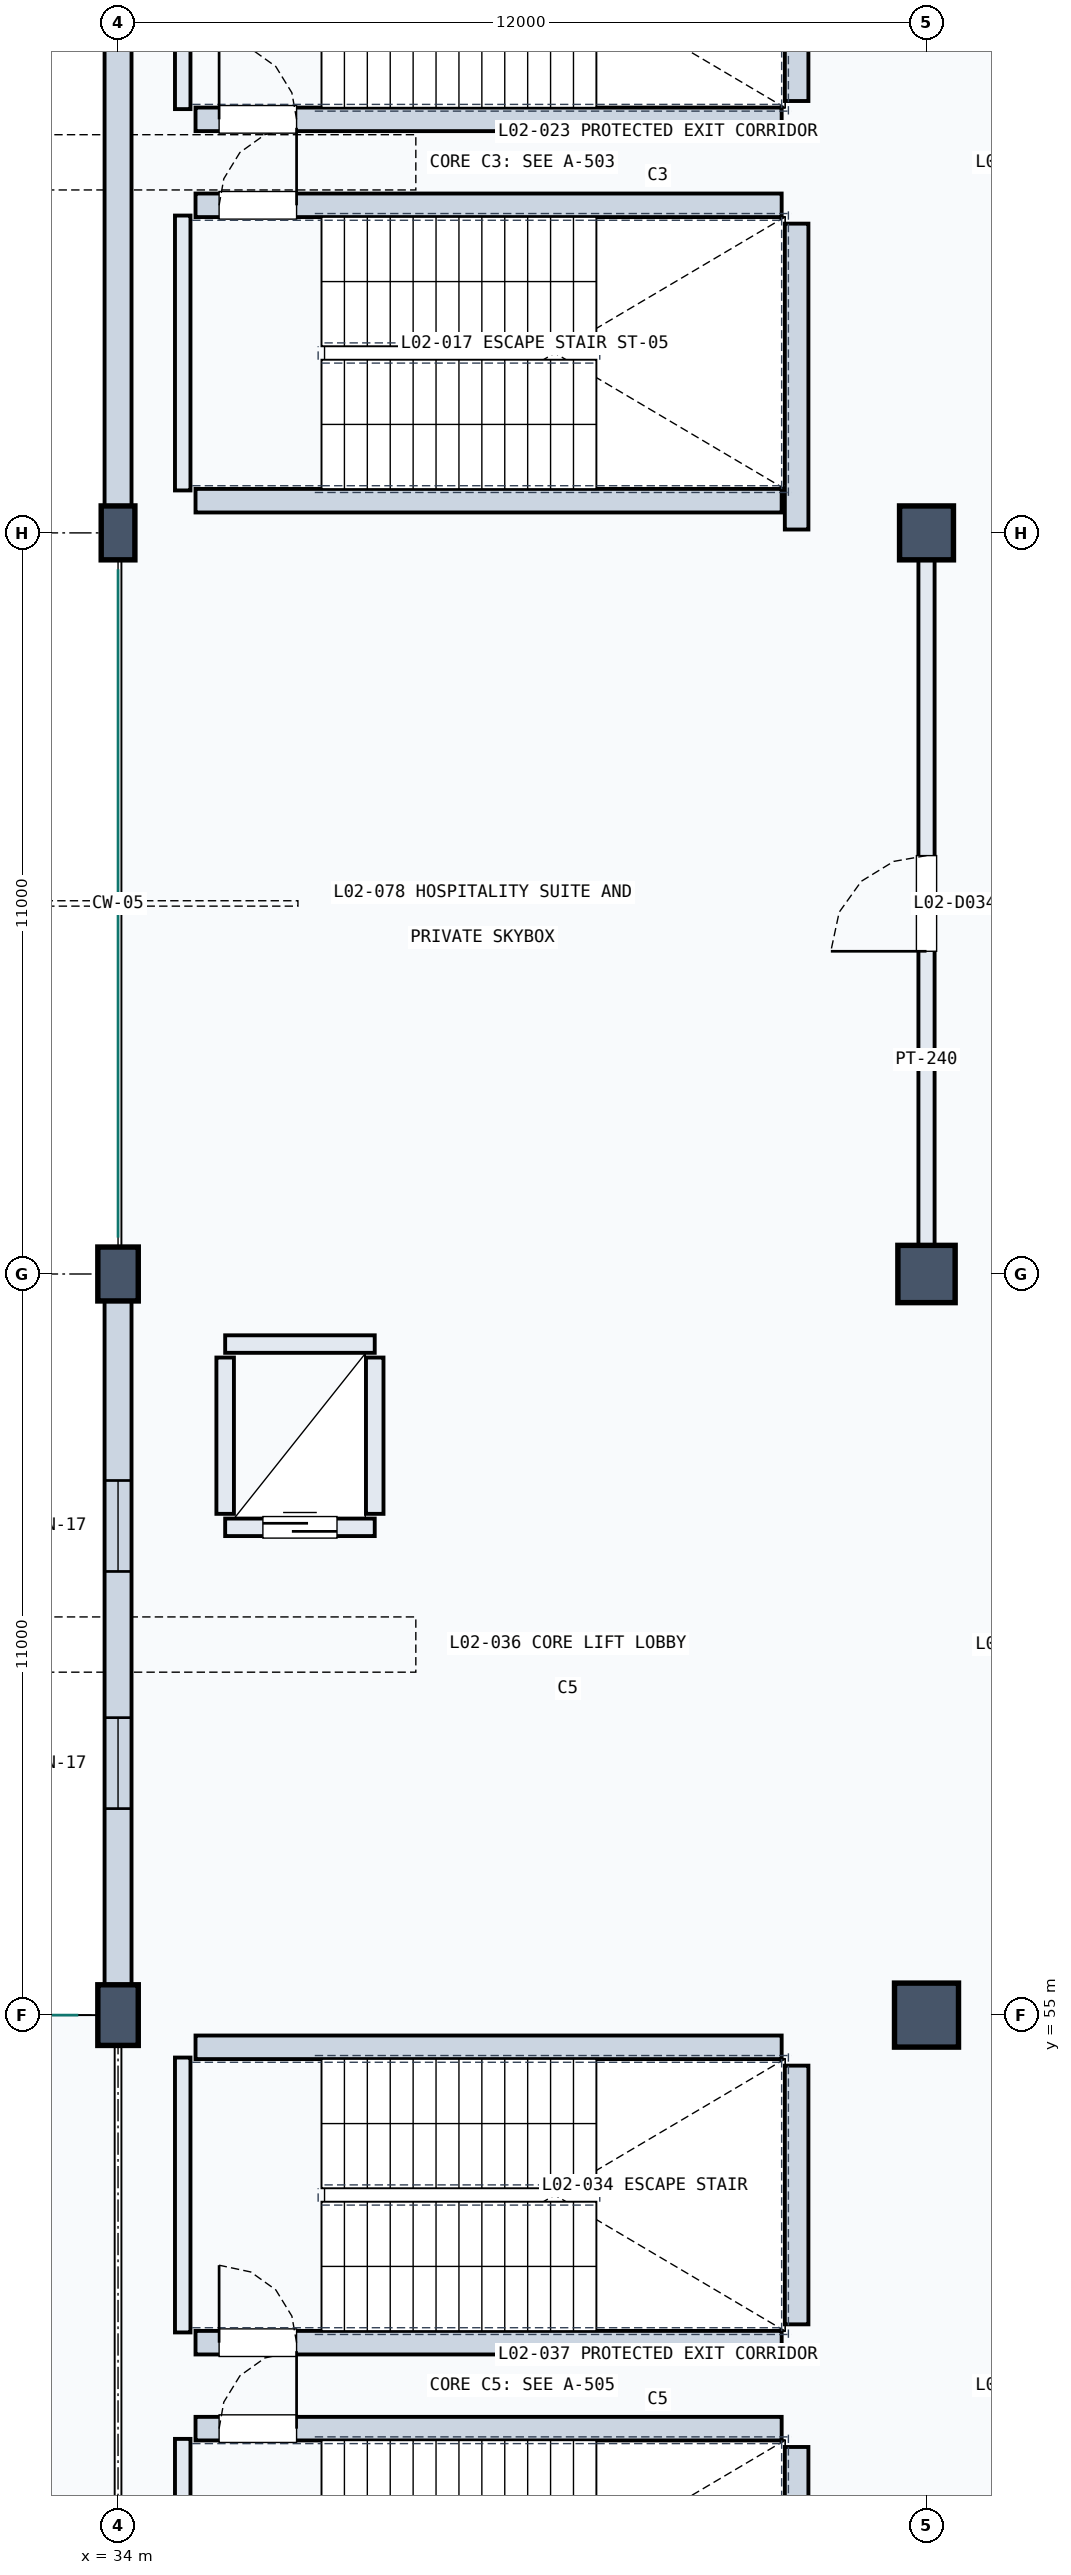
"""IFC4 building model, lengths in metres.
Left out: names, types, materials, properties, quantities, classifications, styles, units other than length and angle.
Written with IfcOpenShell. Run it as: python <this file> out.ifc"""

import sys

from ifc_helpers import new_model, si_unit, direction, frame, frame_2d, origin, origin_2d, place, context, subcontext, project, spatial, rectangle, extrude, element, fill, save


model = new_model("IFC4")
c1 = context("Model", 3, precision=1e-05, world=origin(), true_north=direction((0.0, 1.0)))
c2 = subcontext(c1, "Body", "Model", "MODEL_VIEW")
j1 = project(units=[si_unit("LENGTHUNIT", "METRE"), si_unit("PLANEANGLEUNIT", "RADIAN")], contexts=[c1])
p1 = place(None, origin())
s1 = spatial("IfcSite", under=j1, at=p1, CompositionType="ELEMENT")
p2 = place(p1, origin())
s2 = spatial("IfcBuilding", under=s1, at=p2, CompositionType="ELEMENT")
p3 = place(p2, frame((0.0, 0.0, 10.2)))
s3 = spatial("IfcBuildingStorey", under=s2, at=p3, CompositionType="ELEMENT", Elevation=10.2)
p4 = place(p3, frame((34.0, 55.0, 0.0), z_axis=(0.0, 0.0, 1.0), x_axis=(1.0, 0.0, 0.0)))
e1 = element("IfcColumn", 1, at=p4, inside=s3, PredefinedType="COLUMN", context=c2, shape_type="SweptSolid", body=[
    extrude(rectangle(XDim=0.6, YDim=0.9, at=origin_2d()), origin(), (0.0, 0.0, 1.0), 4.5),
])
p5 = place(p3, frame((34.0, 66.0, 0.0), z_axis=(0.0, 0.0, 1.0), x_axis=(1.0, 0.0, 0.0)))
e2 = element("IfcColumn", 2, at=p5, inside=s3, PredefinedType="COLUMN", context=c2, shape_type="SweptSolid", body=[
    extrude(rectangle(XDim=0.6, YDim=0.8, at=origin_2d()), origin(), (0.0, 0.0, 1.0), 4.5),
])
p6 = place(p3, frame((34.0, 77.0, 0.0), z_axis=(0.0, 0.0, 1.0), x_axis=(1.0, 0.0, 0.0)))
e3 = element("IfcColumn", 3, at=p6, inside=s3, PredefinedType="COLUMN", context=c2, shape_type="SweptSolid", body=[
    extrude(rectangle(XDim=0.5, YDim=0.8, at=origin_2d()), origin(), (0.0, 0.0, 1.0), 4.5),
])
p7 = place(p3, frame((46.0, 55.0, 0.0), z_axis=(0.0, 0.0, 1.0), x_axis=(1.0, 0.0, 0.0)))
e4 = element("IfcColumn", 4, at=p7, inside=s3, PredefinedType="COLUMN", context=c2, shape_type="SweptSolid", body=[
    extrude(rectangle(XDim=0.95, YDim=0.95, at=origin_2d()), origin(), (0.0, 0.0, 1.0), 4.5),
])
p8 = place(p3, frame((46.0, 66.0, 0.0), z_axis=(0.0, 0.0, 1.0), x_axis=(1.0, 0.0, 0.0)))
e5 = element("IfcColumn", 5, at=p8, inside=s3, PredefinedType="COLUMN", context=c2, shape_type="SweptSolid", body=[
    extrude(rectangle(XDim=0.85, YDim=0.85, at=origin_2d()), origin(), (0.0, 0.0, 1.0), 4.5),
])
p9 = place(p3, frame((46.0, 77.0, 0.0), z_axis=(0.0, 0.0, 1.0), x_axis=(1.0, 0.0, 0.0)))
e6 = element("IfcColumn", 6, at=p9, inside=s3, PredefinedType="COLUMN", context=c2, shape_type="SweptSolid", body=[
    extrude(rectangle(XDim=0.8, YDim=0.8, at=origin_2d()), origin(), (0.0, 0.0, 1.0), 4.5),
])
p10 = place(p3, frame((34.0, 55.22, 0.0), z_axis=(0.0, 0.0, 1.0), x_axis=(0.0, 1.0, 0.0)))
e7 = element("IfcWall", 7, at=p10, inside=s3, PredefinedType="SOLIDWALL", context=c2, shape_type="SweptSolid", body=[
    extrude(rectangle(XDim=10.56, YDim=0.4, at=frame_2d((5.28, 0.0))), origin(), (0.0, 0.0, 1.0), 3.39),
])
p11 = place(p10, frame((2.845, 0.0, 0.8)))
e8 = element("IfcOpeningElement", 8, at=p11, cuts=e7, PredefinedType="OPENING", context=c2, shape_type="SweptSolid", body=[
    extrude(rectangle(XDim=1.35, YDim=2.1, at=frame_2d((0.675, 1.05))), frame((0.0, 0.21, 0.0), z_axis=(0.0, -1.0, 0.0), x_axis=(1.0, 0.0, 0.0)), (0.0, 0.0, 1.0), 0.42),
])
p12 = place(p10, frame((6.365, 0.0, 0.8)))
e9 = element("IfcOpeningElement", 9, at=p12, cuts=e7, PredefinedType="OPENING", context=c2, shape_type="SweptSolid", body=[
    extrude(rectangle(XDim=1.35, YDim=2.1, at=frame_2d((0.675, 1.05))), frame((0.0, 0.21, 0.0), z_axis=(0.0, -1.0, 0.0), x_axis=(1.0, 0.0, 0.0)), (0.0, 0.0, 1.0), 0.42),
])
p13 = place(p3, frame((34.0, 77.22, 0.0), z_axis=(0.0, 0.0, 1.0), x_axis=(0.0, 1.0, 0.0)))
e10 = element("IfcWall", 10, at=p13, inside=s3, PredefinedType="SOLIDWALL", context=c2, shape_type="SweptSolid", body=[
    extrude(rectangle(XDim=10.56, YDim=0.4, at=frame_2d((5.28, 0.0))), origin(), (0.0, 0.0, 1.0), 3.405),
])
p14 = place(p3, frame((34.96, 77.63, 0.0), z_axis=(0.0, 0.0, 1.0), x_axis=(0.0, 1.0, 0.0)))
e11 = element("IfcWall", 11, at=p14, inside=s3, PredefinedType="SOLIDWALL", context=c2, shape_type="SweptSolid", body=[
    extrude(rectangle(XDim=4.08, YDim=0.23, at=frame_2d((2.04, 0.0))), origin(), (0.0, 0.0, 1.0), 4.14),
])
p15 = place(p3, frame((44.072, 77.05, 0.0), z_axis=(0.0, 0.0, 1.0), x_axis=(0.0, 1.0, 0.0)))
e12 = element("IfcWall", 12, at=p15, inside=s3, PredefinedType="SOLIDWALL", context=c2, shape_type="SweptSolid", body=[
    extrude(rectangle(XDim=4.54, YDim=0.35, at=frame_2d((2.27, 0.0))), origin(), (0.0, 0.0, 1.0), 4.14),
])
p16 = place(p3, frame((35.15, 77.478, 0.0), z_axis=(0.0, 0.0, 1.0), x_axis=(1.0, 0.0, 0.0)))
e13 = element("IfcWall", 13, at=p16, inside=s3, PredefinedType="SOLIDWALL", context=c2, shape_type="SweptSolid", body=[
    extrude(rectangle(XDim=8.7, YDim=0.35, at=frame_2d((4.35, 0.0))), origin(), (0.0, 0.0, 1.0), 4.14),
])
p17 = place(p3, frame((35.15, 81.862, 0.0), z_axis=(0.0, 0.0, 1.0), x_axis=(1.0, 0.0, 0.0)))
e14 = element("IfcWall", 14, at=p17, inside=s3, PredefinedType="SOLIDWALL", context=c2, shape_type="SweptSolid", body=[
    extrude(rectangle(XDim=8.7, YDim=0.35, at=frame_2d((4.35, 0.0))), origin(), (0.0, 0.0, 1.0), 4.14),
])
p18 = place(p17, frame((0.35, 0.0, 0.0)))
e15 = element("IfcOpeningElement", 15, at=p18, cuts=e14, PredefinedType="OPENING", context=c2, shape_type="SweptSolid", body=[
    extrude(rectangle(XDim=1.15, YDim=2.2, at=frame_2d((0.575, 1.1))), frame((0.0, 0.185, 0.0), z_axis=(0.0, -1.0, 0.0), x_axis=(1.0, 0.0, 0.0)), (0.0, 0.0, 1.0), 0.37),
])
p19 = place(p3, frame((34.96, 83.29, 0.0), z_axis=(0.0, 0.0, 1.0), x_axis=(0.0, 1.0, 0.0)))
e16 = element("IfcWall", 16, at=p19, inside=s3, PredefinedType="SOLIDWALL", context=c2, shape_type="SweptSolid", body=[
    extrude(rectangle(XDim=4.08, YDim=0.23, at=frame_2d((2.04, 0.0))), origin(), (0.0, 0.0, 1.0), 4.14),
])
p20 = place(p3, frame((44.072, 83.41, 0.0), z_axis=(0.0, 0.0, 1.0), x_axis=(0.0, 1.0, 0.0)))
e17 = element("IfcWall", 17, at=p20, inside=s3, PredefinedType="SOLIDWALL", context=c2, shape_type="SweptSolid", body=[
    extrude(rectangle(XDim=3.84, YDim=0.35, at=frame_2d((1.92, 0.0))), origin(), (0.0, 0.0, 1.0), 4.14),
])
p21 = place(p3, frame((35.15, 83.138, 0.0), z_axis=(0.0, 0.0, 1.0), x_axis=(1.0, 0.0, 0.0)))
e18 = element("IfcWall", 18, at=p21, inside=s3, PredefinedType="SOLIDWALL", context=c2, shape_type="SweptSolid", body=[
    extrude(rectangle(XDim=8.7, YDim=0.35, at=frame_2d((4.35, 0.0))), origin(), (0.0, 0.0, 1.0), 4.14),
])
p22 = place(p21, frame((0.35, 0.0, 0.0)))
e19 = element("IfcOpeningElement", 19, at=p22, cuts=e18, PredefinedType="OPENING", context=c2, shape_type="SweptSolid", body=[
    extrude(rectangle(XDim=1.15, YDim=2.2, at=frame_2d((0.575, 1.1))), frame((0.0, 0.185, 0.0), z_axis=(0.0, -1.0, 0.0), x_axis=(1.0, 0.0, 0.0)), (0.0, 0.0, 1.0), 0.37),
])
p23 = place(p3, frame((34.96, 44.63, 0.0), z_axis=(0.0, 0.0, 1.0), x_axis=(0.0, 1.0, 0.0)))
e20 = element("IfcWall", 20, at=p23, inside=s3, PredefinedType="SOLIDWALL", context=c2, shape_type="SweptSolid", body=[
    extrude(rectangle(XDim=4.08, YDim=0.23, at=frame_2d((2.04, 0.0))), origin(), (0.0, 0.0, 1.0), 4.14),
])
p24 = place(p3, frame((44.072, 44.05, 0.0), z_axis=(0.0, 0.0, 1.0), x_axis=(0.0, 1.0, 0.0)))
e21 = element("IfcWall", 21, at=p24, inside=s3, PredefinedType="SOLIDWALL", context=c2, shape_type="SweptSolid", body=[
    extrude(rectangle(XDim=4.54, YDim=0.35, at=frame_2d((2.27, 0.0))), origin(), (0.0, 0.0, 1.0), 4.14),
])
p25 = place(p3, frame((35.15, 48.862, 0.0), z_axis=(0.0, 0.0, 1.0), x_axis=(1.0, 0.0, 0.0)))
e22 = element("IfcWall", 22, at=p25, inside=s3, PredefinedType="SOLIDWALL", context=c2, shape_type="SweptSolid", body=[
    extrude(rectangle(XDim=8.7, YDim=0.35, at=frame_2d((4.35, 0.0))), origin(), (0.0, 0.0, 1.0), 4.14),
])
p26 = place(p25, frame((0.35, 0.0, 0.0)))
e23 = element("IfcOpeningElement", 23, at=p26, cuts=e22, PredefinedType="OPENING", context=c2, shape_type="SweptSolid", body=[
    extrude(rectangle(XDim=1.15, YDim=2.2, at=frame_2d((0.575, 1.1))), frame((0.0, 0.185, 0.0), z_axis=(0.0, -1.0, 0.0), x_axis=(1.0, 0.0, 0.0)), (0.0, 0.0, 1.0), 0.37),
])
p27 = place(p3, frame((34.96, 50.29, 0.0), z_axis=(0.0, 0.0, 1.0), x_axis=(0.0, 1.0, 0.0)))
e24 = element("IfcWall", 24, at=p27, inside=s3, PredefinedType="SOLIDWALL", context=c2, shape_type="SweptSolid", body=[
    extrude(rectangle(XDim=4.08, YDim=0.23, at=frame_2d((2.04, 0.0))), origin(), (0.0, 0.0, 1.0), 4.14),
])
p28 = place(p3, frame((44.072, 50.41, 0.0), z_axis=(0.0, 0.0, 1.0), x_axis=(0.0, 1.0, 0.0)))
e25 = element("IfcWall", 25, at=p28, inside=s3, PredefinedType="SOLIDWALL", context=c2, shape_type="SweptSolid", body=[
    extrude(rectangle(XDim=3.84, YDim=0.35, at=frame_2d((1.92, 0.0))), origin(), (0.0, 0.0, 1.0), 4.14),
])
p29 = place(p3, frame((35.15, 50.138, 0.0), z_axis=(0.0, 0.0, 1.0), x_axis=(1.0, 0.0, 0.0)))
e26 = element("IfcWall", 26, at=p29, inside=s3, PredefinedType="SOLIDWALL", context=c2, shape_type="SweptSolid", body=[
    extrude(rectangle(XDim=8.7, YDim=0.35, at=frame_2d((4.35, 0.0))), origin(), (0.0, 0.0, 1.0), 4.14),
])
p30 = place(p29, frame((0.35, 0.0, 0.0)))
e27 = element("IfcOpeningElement", 27, at=p30, cuts=e26, PredefinedType="OPENING", context=c2, shape_type="SweptSolid", body=[
    extrude(rectangle(XDim=1.15, YDim=2.2, at=frame_2d((0.575, 1.1))), frame((0.0, 0.185, 0.0), z_axis=(0.0, -1.0, 0.0), x_axis=(1.0, 0.0, 0.0)), (0.0, 0.0, 1.0), 0.37),
])
p31 = place(p3, frame((35.15, 54.522, 0.0), z_axis=(0.0, 0.0, 1.0), x_axis=(1.0, 0.0, 0.0)))
e28 = element("IfcWall", 28, at=p31, inside=s3, PredefinedType="SOLIDWALL", context=c2, shape_type="SweptSolid", body=[
    extrude(rectangle(XDim=8.7, YDim=0.35, at=frame_2d((4.35, 0.0))), origin(), (0.0, 0.0, 1.0), 4.14),
])
p32 = place(p3, frame((35.59, 62.24, 0.0), z_axis=(0.0, 0.0, 1.0), x_axis=(1.0, 0.0, 0.0)))
e29 = element("IfcWall", 29, at=p32, inside=s3, PredefinedType="SOLIDWALL", context=c2, shape_type="SweptSolid", body=[
    extrude(rectangle(XDim=2.22, YDim=0.26, at=frame_2d((1.11, 0.0))), origin(), (0.0, 0.0, 1.0), 4.14),
])
p33 = place(p32, frame((0.56, 0.0, 0.0)))
e30 = element("IfcOpeningElement", 30, at=p33, cuts=e29, PredefinedType="OPENING", context=c2, shape_type="SweptSolid", body=[
    extrude(rectangle(XDim=1.1, YDim=2.15, at=frame_2d((0.55, 1.075))), frame((0.0, 0.14, 0.0), z_axis=(0.0, -1.0, 0.0), x_axis=(1.0, 0.0, 0.0)), (0.0, 0.0, 1.0), 0.28),
])
p34 = place(p3, frame((35.59, 64.96, 0.0), z_axis=(0.0, 0.0, 1.0), x_axis=(1.0, 0.0, 0.0)))
e31 = element("IfcWall", 31, at=p34, inside=s3, PredefinedType="SOLIDWALL", context=c2, shape_type="SweptSolid", body=[
    extrude(rectangle(XDim=2.22, YDim=0.26, at=frame_2d((1.11, 0.0))), origin(), (0.0, 0.0, 1.0), 4.14),
])
for number, where, z_axis, x_axis in (
    (32, (35.59, 62.44, 0.0), (0.0, 0.0, 1.0), (0.0, 1.0, 0.0)),
    (33, (37.81, 62.44, 0.0), (0.0, 0.0, 1.0), (0.0, 1.0, 0.0)),
):
    element("IfcWall", number, at=place(p3, frame(where, z_axis=z_axis, x_axis=x_axis)), inside=s3, PredefinedType="SOLIDWALL", context=c2, shape_type="SweptSolid", body=[
        extrude(rectangle(XDim=2.32, YDim=0.26, at=frame_2d((1.16, 0.0))), origin(), (0.0, 0.0, 1.0), 4.14),
    ])
p35 = place(p3, frame((46.0, 66.22, 0.0), z_axis=(0.0, 0.0, 1.0), x_axis=(0.0, 1.0, 0.0)))
e34 = element("IfcWall", 34, at=p35, inside=s3, PredefinedType="PARTITIONING", context=c2, shape_type="SweptSolid", body=[
    extrude(rectangle(XDim=10.56, YDim=0.24, at=frame_2d((5.28, 0.0))), origin(), (0.0, 0.0, 1.0), 3.405),
])
p36 = place(p35, frame((4.57, 0.0, 0.0)))
e35 = element("IfcOpeningElement", 35, at=p36, cuts=e34, PredefinedType="OPENING", context=c2, shape_type="SweptSolid", body=[
    extrude(rectangle(XDim=1.42, YDim=2.25, at=frame_2d((0.71, 1.125))), frame((0.0, 0.13, 0.0), z_axis=(0.0, -1.0, 0.0), x_axis=(1.0, 0.0, 0.0)), (0.0, 0.0, 1.0), 0.26),
])
p37 = place(p11, origin())
e36 = element("IfcWindow", 36, at=p37, inside=s3, PartitioningType="SINGLE_PANEL", PredefinedType="WINDOW", context=c2, shape_type="SweptSolid", body=[
    extrude(rectangle(XDim=1.35, YDim=2.1, at=frame_2d((0.675, 1.05))), frame((0.0, 0.03, 0.0), z_axis=(0.0, -1.0, 0.0), x_axis=(1.0, 0.0, 0.0)), (0.0, 0.0, 1.0), 0.06),
])
fill(e8, e36)
p38 = place(p12, origin())
e37 = element("IfcWindow", 37, at=p38, inside=s3, PartitioningType="SINGLE_PANEL", PredefinedType="WINDOW", context=c2, shape_type="SweptSolid", body=[
    extrude(rectangle(XDim=1.35, YDim=2.1, at=frame_2d((0.675, 1.05))), frame((0.0, 0.03, 0.0), z_axis=(0.0, -1.0, 0.0), x_axis=(1.0, 0.0, 0.0)), (0.0, 0.0, 1.0), 0.06),
])
fill(e9, e37)
p39 = place(p18, origin())
e38 = element("IfcDoor", 38, at=p39, inside=s3, OperationType="SINGLE_SWING_RIGHT", PredefinedType="DOOR", context=c2, shape_type="SweptSolid", body=[
    extrude(rectangle(XDim=1.15, YDim=2.2, at=frame_2d((0.575, 1.1))), frame((0.0, 0.025, 0.0), z_axis=(0.0, -1.0, 0.0), x_axis=(1.0, 0.0, 0.0)), (0.0, 0.0, 1.0), 0.05),
])
fill(e15, e38)
p40 = place(p22, origin())
e39 = element("IfcDoor", 39, at=p40, inside=s3, OperationType="SINGLE_SWING_LEFT", PredefinedType="DOOR", context=c2, shape_type="SweptSolid", body=[
    extrude(rectangle(XDim=1.15, YDim=2.2, at=frame_2d((0.575, 1.1))), frame((0.0, 0.025, 0.0), z_axis=(0.0, -1.0, 0.0), x_axis=(1.0, 0.0, 0.0)), (0.0, 0.0, 1.0), 0.05),
])
fill(e19, e39)
p41 = place(p26, origin())
e40 = element("IfcDoor", 40, at=p41, inside=s3, OperationType="SINGLE_SWING_RIGHT", PredefinedType="DOOR", context=c2, shape_type="SweptSolid", body=[
    extrude(rectangle(XDim=1.15, YDim=2.2, at=frame_2d((0.575, 1.1))), frame((0.0, 0.025, 0.0), z_axis=(0.0, -1.0, 0.0), x_axis=(1.0, 0.0, 0.0)), (0.0, 0.0, 1.0), 0.05),
])
fill(e23, e40)
p42 = place(p30, origin())
e41 = element("IfcDoor", 41, at=p42, inside=s3, OperationType="SINGLE_SWING_LEFT", PredefinedType="DOOR", context=c2, shape_type="SweptSolid", body=[
    extrude(rectangle(XDim=1.15, YDim=2.2, at=frame_2d((0.575, 1.1))), frame((0.0, 0.025, 0.0), z_axis=(0.0, -1.0, 0.0), x_axis=(1.0, 0.0, 0.0)), (0.0, 0.0, 1.0), 0.05),
])
fill(e27, e41)
p43 = place(p33, origin())
e42 = element("IfcDoor", 42, at=p43, inside=s3, OperationType="SLIDING_TO_LEFT", PredefinedType="DOOR", context=c2, shape_type="SweptSolid", body=[
    extrude(rectangle(XDim=1.1, YDim=2.15, at=frame_2d((0.55, 1.075))), frame((0.0, 0.025, 0.0), z_axis=(0.0, -1.0, 0.0), x_axis=(1.0, 0.0, 0.0)), (0.0, 0.0, 1.0), 0.05),
])
fill(e30, e42)
p44 = place(p36, origin())
e43 = element("IfcDoor", 43, at=p44, inside=s3, OperationType="SINGLE_SWING_LEFT", PredefinedType="DOOR", context=c2, shape_type="SweptSolid", body=[
    extrude(rectangle(XDim=1.42, YDim=2.25, at=frame_2d((0.71, 1.125))), frame((0.0, 0.025, 0.0), z_axis=(0.0, -1.0, 0.0), x_axis=(1.0, 0.0, 0.0)), (0.0, 0.0, 1.0), 0.05),
])
fill(e35, e43)
save(model, sys.argv[1])
